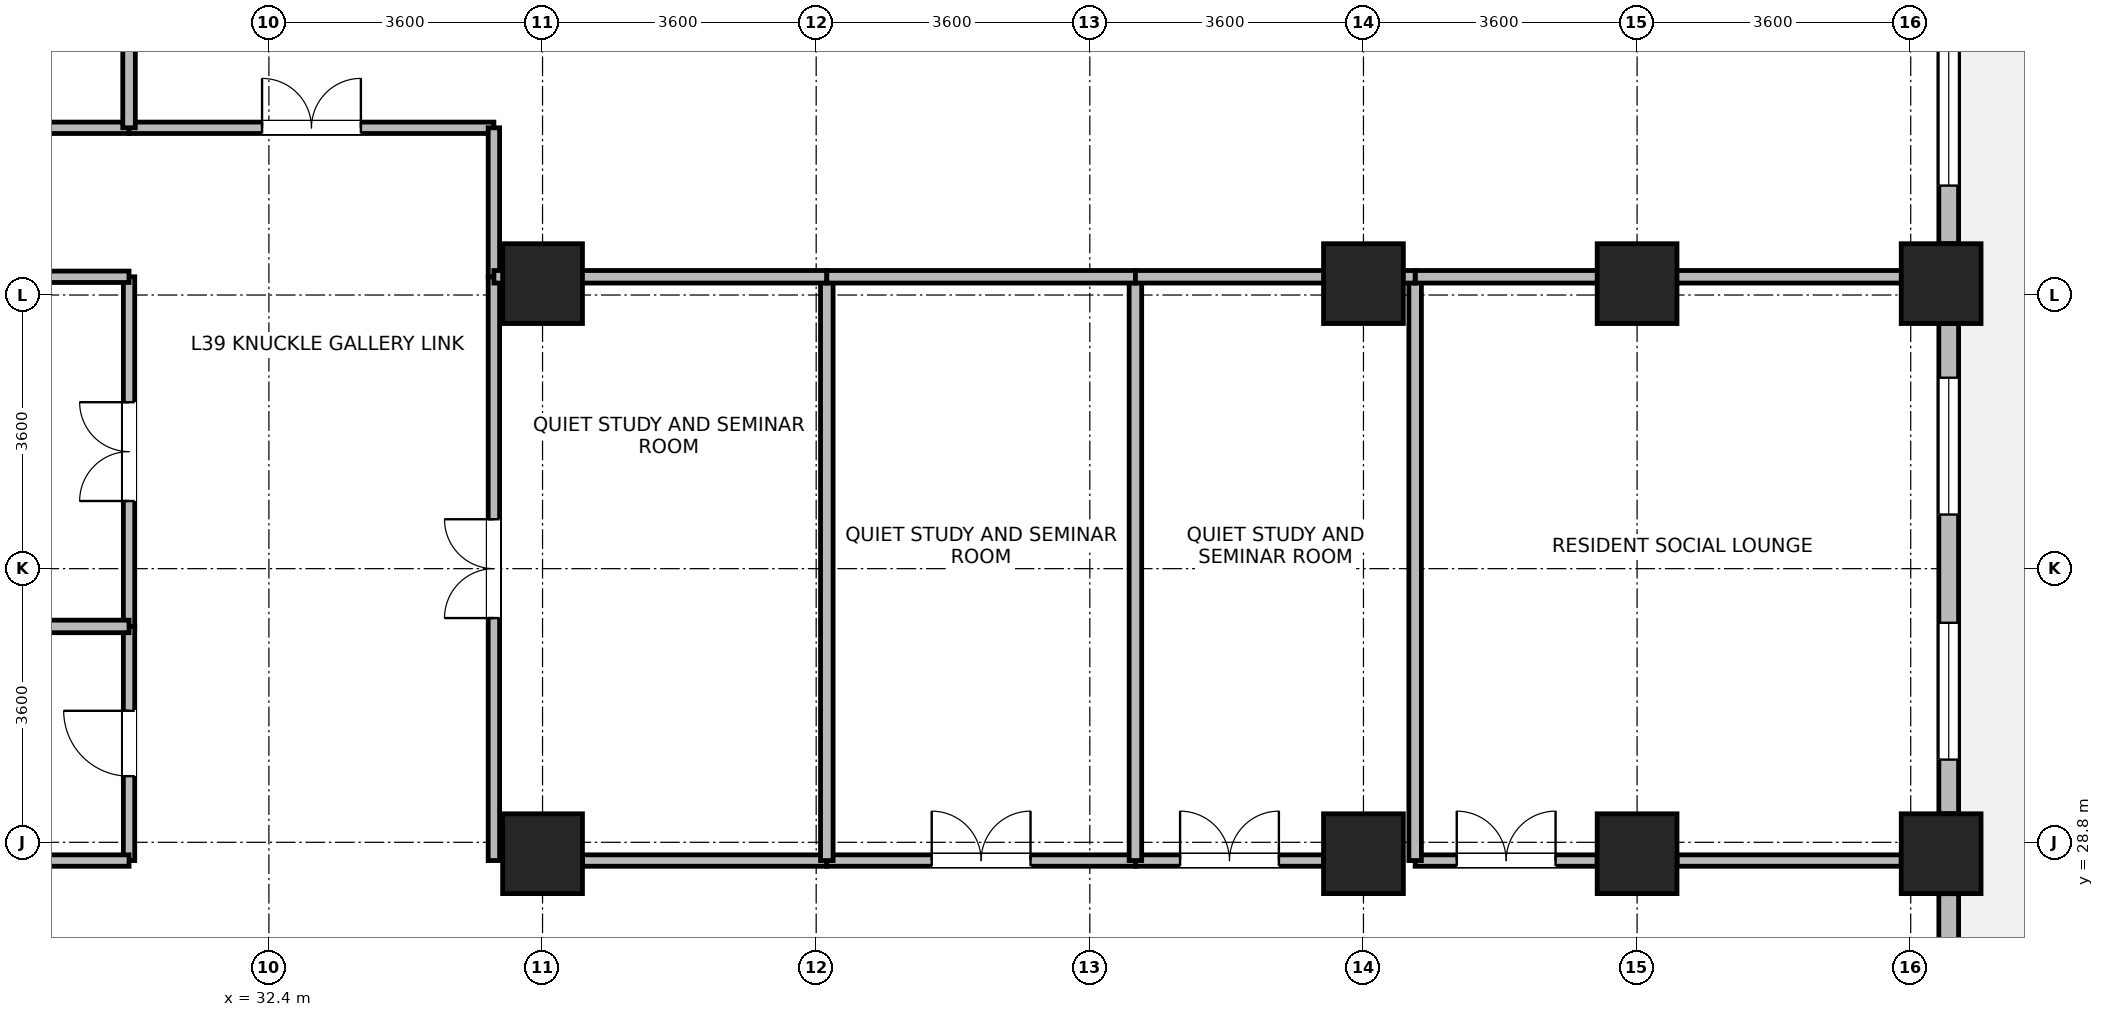
"""IFC4 building model, lengths in metres.
Left out: names, types, materials, properties, quantities, classifications, styles, units other than length and angle.
Written with IfcOpenShell. Run it as: python <this file> out.ifc"""

import sys

from ifc_helpers import new_model, si_unit, direction, frame, frame_2d, origin, origin_2d, place, context, subcontext, project, spatial, rectangle, extrude, source, transform, mapped, element, fill, save


model = new_model("IFC4")
c1 = context("Model", 3, precision=1e-05, world=origin(), true_north=direction((0.0, 1.0)))
c2 = subcontext(c1, "Body", "Model", "MODEL_VIEW")
j1 = project(units=[si_unit("LENGTHUNIT", "METRE"), si_unit("PLANEANGLEUNIT", "RADIAN")], contexts=[c1])
p1 = place(None, origin())
s1 = spatial("IfcSite", under=j1, at=p1, CompositionType="ELEMENT")
p2 = place(p1, origin())
s2 = spatial("IfcBuilding", under=s1, at=p2, CompositionType="ELEMENT")
p3 = place(p2, frame((0.0, 0.0, 155.0)))
s3 = spatial("IfcBuildingStorey", under=s2, at=p3, CompositionType="ELEMENT", Elevation=155.0)
m1 = source(origin(), c2, "Body", "SweptSolid", [
    extrude(rectangle(XDim=1.05, YDim=1.05, at=origin_2d()), origin(), (0.0, 0.0, 1.0), 3.7),
])
for number, where, z_axis, x_axis in (
    (1, (36.0, 28.65, 0.0), (0.0, 0.0, 1.0), (1.0, 0.0, 0.0)),
    (2, (36.0, 36.15, 0.0), (0.0, 0.0, 1.0), (1.0, 0.0, 0.0)),
    (3, (46.8, 28.65, 0.0), (0.0, 0.0, 1.0), (1.0, 0.0, 0.0)),
    (4, (46.8, 36.15, 0.0), (0.0, 0.0, 1.0), (1.0, 0.0, 0.0)),
    (5, (50.4, 28.65, 0.0), (0.0, 0.0, 1.0), (1.0, 0.0, 0.0)),
    (6, (50.4, 36.15, 0.0), (0.0, 0.0, 1.0), (1.0, 0.0, 0.0)),
    (7, (54.4, 28.65, 0.0), (0.0, 0.0, 1.0), (1.0, 0.0, 0.0)),
    (8, (54.4, 36.15, 0.0), (0.0, 0.0, 1.0), (1.0, 0.0, 0.0)),
):
    element("IfcColumn", number, at=place(p3, frame(where, z_axis=z_axis, x_axis=x_axis)), inside=s3, PredefinedType="COLUMN", context=c2, shape_type="MappedRepresentation", body=[
        mapped(m1, transform((0.0, 0.0, 0.0), x_axis=(1.0, 0.0, 0.0), y_axis=(0.0, 1.0, 0.0), z_axis=(0.0, 0.0, 1.0), scale=1.0)),
    ])
p4 = place(p3, frame((54.5, 28.124, 0.0), z_axis=(0.0, 0.0, 1.0), x_axis=(0.0, -1.0, 0.0)))
e9 = element("IfcWall", 9, at=p4, inside=s3, PredefinedType="STANDARD", context=c2, shape_type="SweptSolid", body=[
    extrude(rectangle(XDim=5.998, YDim=0.26, at=frame_2d((2.999, 0.0))), origin(), (0.0, 0.0, 1.0), 2.99),
])
p5 = place(p4, frame((3.598, 0.0, 0.85)))
e10 = element("IfcOpeningElement", 10, at=p5, cuts=e9, PredefinedType="OPENING", context=c2, shape_type="SweptSolid", body=[
    extrude(rectangle(XDim=1.8, YDim=1.85, at=frame_2d((0.9, 0.925))), frame((0.0, 0.14, 0.0), z_axis=(0.0, -1.0, 0.0), x_axis=(1.0, 0.0, 0.0)), (0.0, 0.0, 1.0), 0.28),
])
p6 = place(p4, frame((2.044, 0.0, 0.85)))
e11 = element("IfcOpeningElement", 11, at=p6, cuts=e9, PredefinedType="OPENING", context=c2, shape_type="SweptSolid", body=[
    extrude(rectangle(XDim=0.95, YDim=1.75, at=frame_2d((0.475, 0.875))), frame((0.0, 0.14, 0.0), z_axis=(0.0, -1.0, 0.0), x_axis=(1.0, 0.0, 0.0)), (0.0, 0.0, 1.0), 0.28),
])
p7 = place(p3, frame((54.5, 35.624, 0.0), z_axis=(0.0, 0.0, 1.0), x_axis=(0.0, -1.0, 0.0)))
e12 = element("IfcWall", 12, at=p7, inside=s3, PredefinedType="STANDARD", context=c2, shape_type="SweptSolid", body=[
    extrude(rectangle(XDim=6.448, YDim=0.26, at=frame_2d((3.224, 0.0))), origin(), (0.0, 0.0, 1.0), 2.99),
])
p8 = place(p7, frame((0.712, 0.0, 0.85)))
e13 = element("IfcOpeningElement", 13, at=p8, cuts=e12, PredefinedType="OPENING", context=c2, shape_type="SweptSolid", body=[
    extrude(rectangle(XDim=1.8, YDim=1.85, at=frame_2d((0.9, 0.925))), frame((0.0, 0.14, 0.0), z_axis=(0.0, -1.0, 0.0), x_axis=(1.0, 0.0, 0.0)), (0.0, 0.0, 1.0), 0.28),
])
p9 = place(p7, frame((3.936, 0.0, 0.85)))
e14 = element("IfcOpeningElement", 14, at=p9, cuts=e12, PredefinedType="OPENING", context=c2, shape_type="SweptSolid", body=[
    extrude(rectangle(XDim=1.8, YDim=1.85, at=frame_2d((0.9, 0.925))), frame((0.0, 0.14, 0.0), z_axis=(0.0, -1.0, 0.0), x_axis=(1.0, 0.0, 0.0)), (0.0, 0.0, 1.0), 0.28),
])
p10 = place(p3, frame((54.5, 43.33, 0.0), z_axis=(0.0, 0.0, 1.0), x_axis=(0.0, -1.0, 0.0)))
e15 = element("IfcWall", 15, at=p10, inside=s3, PredefinedType="STANDARD", context=c2, shape_type="SweptSolid", body=[
    extrude(rectangle(XDim=6.654, YDim=0.26, at=frame_2d((3.327, 0.0))), origin(), (0.0, 0.0, 1.0), 3.44),
])
p11 = place(p10, frame((0.763, 0.0, 0.85)))
e16 = element("IfcOpeningElement", 16, at=p11, cuts=e15, PredefinedType="OPENING", context=c2, shape_type="SweptSolid", body=[
    extrude(rectangle(XDim=1.8, YDim=1.85, at=frame_2d((0.9, 0.925))), frame((0.0, 0.14, 0.0), z_axis=(0.0, -1.0, 0.0), x_axis=(1.0, 0.0, 0.0)), (0.0, 0.0, 1.0), 0.28),
])
p12 = place(p10, frame((4.091, 0.0, 0.85)))
e17 = element("IfcOpeningElement", 17, at=p12, cuts=e15, PredefinedType="OPENING", context=c2, shape_type="SweptSolid", body=[
    extrude(rectangle(XDim=1.8, YDim=1.85, at=frame_2d((0.9, 0.925))), frame((0.0, 0.14, 0.0), z_axis=(0.0, -1.0, 0.0), x_axis=(1.0, 0.0, 0.0)), (0.0, 0.0, 1.0), 0.28),
])
p13 = place(p3, frame((22.74, 38.2, 0.0), z_axis=(0.0, 0.0, 1.0), x_axis=(1.0, 0.0, 0.0)))
e18 = element("IfcWall", 18, at=p13, inside=s3, PredefinedType="PARTITIONING", context=c2, shape_type="SweptSolid", body=[
    extrude(rectangle(XDim=7.82, YDim=0.15, at=frame_2d((3.91, 0.0))), origin(), (0.0, 0.0, 1.0), 3.44),
])
p14 = place(p13, frame((3.46, 0.0, 0.0)))
e19 = element("IfcOpeningElement", 19, at=p14, cuts=e18, PredefinedType="OPENING", context=c2, shape_type="SweptSolid", body=[
    extrude(rectangle(XDim=0.9, YDim=2.08, at=frame_2d((0.45, 1.04))), frame((0.0, 0.085, 0.0), z_axis=(0.0, -1.0, 0.0), x_axis=(1.0, 0.0, 0.0)), (0.0, 0.0, 1.0), 0.17),
])
p15 = place(p3, frame((35.36, 28.56, 0.0), z_axis=(0.0, 0.0, 1.0), x_axis=(0.0, 1.0, 0.0)))
e20 = element("IfcWall", 20, at=p15, inside=s3, PredefinedType="PARTITIONING", context=c2, shape_type="SweptSolid", body=[
    extrude(rectangle(XDim=7.68, YDim=0.15, at=frame_2d((3.84, 0.0))), origin(), (0.0, 0.0, 1.0), 3.44),
])
p16 = place(p15, frame((3.19, 0.0, 0.0)))
e21 = element("IfcOpeningElement", 21, at=p16, cuts=e20, PredefinedType="OPENING", context=c2, shape_type="SweptSolid", body=[
    extrude(rectangle(XDim=1.3, YDim=2.12, at=frame_2d((0.65, 1.06))), frame((0.0, 0.085, 0.0), z_axis=(0.0, -1.0, 0.0), x_axis=(1.0, 0.0, 0.0)), (0.0, 0.0, 1.0), 0.17),
])
p17 = place(p3, frame((47.48, 28.56, 0.0), z_axis=(0.0, 0.0, 1.0), x_axis=(1.0, 0.0, 0.0)))
e22 = element("IfcWall", 22, at=p17, inside=s3, PredefinedType="PARTITIONING", context=c2, shape_type="SweptSolid", body=[
    extrude(rectangle(XDim=2.395, YDim=0.15, at=frame_2d((1.198, 0.0))), origin(), (0.0, 0.0, 1.0), 2.84),
])
p18 = place(p17, frame((0.548, 0.0, 0.0)))
e23 = element("IfcOpeningElement", 23, at=p18, cuts=e22, PredefinedType="OPENING", context=c2, shape_type="SweptSolid", body=[
    extrude(rectangle(XDim=1.3, YDim=2.12, at=frame_2d((0.65, 1.06))), frame((0.0, 0.085, 0.0), z_axis=(0.0, -1.0, 0.0), x_axis=(1.0, 0.0, 0.0)), (0.0, 0.0, 1.0), 0.17),
])
p19 = place(p3, frame((50.925, 28.56, 0.0), z_axis=(0.0, 0.0, 1.0), x_axis=(1.0, 0.0, 0.0)))
e24 = element("IfcWall", 24, at=p19, inside=s3, PredefinedType="PARTITIONING", context=c2, shape_type="SweptSolid", body=[
    extrude(rectangle(XDim=2.95, YDim=0.15, at=frame_2d((1.475, 0.0))), origin(), (0.0, 0.0, 1.0), 2.84),
])
p20 = place(p3, frame((30.56, 38.2, 0.0), z_axis=(0.0, 0.0, 1.0), x_axis=(1.0, 0.0, 0.0)))
e25 = element("IfcWall", 25, at=p20, inside=s3, PredefinedType="PARTITIONING", context=c2, shape_type="SweptSolid", body=[
    extrude(rectangle(XDim=4.8, YDim=0.15, at=frame_2d((2.4, 0.0))), origin(), (0.0, 0.0, 1.0), 3.44),
])
p21 = place(p20, frame((1.75, 0.0, 0.0)))
e26 = element("IfcOpeningElement", 26, at=p21, cuts=e25, PredefinedType="OPENING", context=c2, shape_type="SweptSolid", body=[
    extrude(rectangle(XDim=1.3, YDim=2.12, at=frame_2d((0.65, 1.06))), frame((0.0, 0.085, 0.0), z_axis=(0.0, -1.0, 0.0), x_axis=(1.0, 0.0, 0.0)), (0.0, 0.0, 1.0), 0.17),
])
p22 = place(p3, frame((30.56, 31.64, 0.0), z_axis=(0.0, 0.0, 1.0), x_axis=(0.0, 1.0, 0.0)))
e27 = element("IfcWall", 27, at=p22, inside=s3, PredefinedType="PARTITIONING", context=c2, shape_type="SweptSolid", body=[
    extrude(rectangle(XDim=4.6, YDim=0.15, at=frame_2d((2.3, 0.0))), origin(), (0.0, 0.0, 1.0), 3.44),
])
p23 = place(p22, frame((1.65, 0.0, 0.0)))
e28 = element("IfcOpeningElement", 28, at=p23, cuts=e27, PredefinedType="OPENING", context=c2, shape_type="SweptSolid", body=[
    extrude(rectangle(XDim=1.3, YDim=2.12, at=frame_2d((0.65, 1.06))), frame((0.0, 0.085, 0.0), z_axis=(0.0, -1.0, 0.0), x_axis=(1.0, 0.0, 0.0)), (0.0, 0.0, 1.0), 0.17),
])
p24 = place(p3, frame((36.525, 28.56, 0.0), z_axis=(0.0, 0.0, 1.0), x_axis=(1.0, 0.0, 0.0)))
e29 = element("IfcWall", 29, at=p24, inside=s3, PredefinedType="PARTITIONING", context=c2, shape_type="SweptSolid", body=[
    extrude(rectangle(XDim=3.215, YDim=0.15, at=frame_2d((1.607, 0.0))), origin(), (0.0, 0.0, 1.0), 2.84),
])
p25 = place(p3, frame((39.74, 28.56, 0.0), z_axis=(0.0, 0.0, 1.0), x_axis=(1.0, 0.0, 0.0)))
e30 = element("IfcWall", 30, at=p25, inside=s3, PredefinedType="PARTITIONING", context=c2, shape_type="SweptSolid", body=[
    extrude(rectangle(XDim=4.06, YDim=0.15, at=frame_2d((2.03, 0.0))), origin(), (0.0, 0.0, 1.0), 2.84),
])
p26 = place(p25, frame((1.38, 0.0, 0.0)))
e31 = element("IfcOpeningElement", 31, at=p26, cuts=e30, PredefinedType="OPENING", context=c2, shape_type="SweptSolid", body=[
    extrude(rectangle(XDim=1.3, YDim=2.12, at=frame_2d((0.65, 1.06))), frame((0.0, 0.085, 0.0), z_axis=(0.0, -1.0, 0.0), x_axis=(1.0, 0.0, 0.0)), (0.0, 0.0, 1.0), 0.17),
])
p27 = place(p3, frame((43.8, 28.56, 0.0), z_axis=(0.0, 0.0, 1.0), x_axis=(1.0, 0.0, 0.0)))
e32 = element("IfcWall", 32, at=p27, inside=s3, PredefinedType="PARTITIONING", context=c2, shape_type="SweptSolid", body=[
    extrude(rectangle(XDim=2.475, YDim=0.15, at=frame_2d((1.237, 0.0))), origin(), (0.0, 0.0, 1.0), 2.84),
])
p28 = place(p27, frame((0.587, 0.0, 0.0)))
e33 = element("IfcOpeningElement", 33, at=p28, cuts=e32, PredefinedType="OPENING", context=c2, shape_type="SweptSolid", body=[
    extrude(rectangle(XDim=1.3, YDim=2.12, at=frame_2d((0.65, 1.06))), frame((0.0, 0.085, 0.0), z_axis=(0.0, -1.0, 0.0), x_axis=(1.0, 0.0, 0.0)), (0.0, 0.0, 1.0), 0.17),
])
p29 = place(p3, frame((30.56, 28.56, 0.0), z_axis=(0.0, 0.0, 1.0), x_axis=(0.0, 1.0, 0.0)))
e34 = element("IfcWall", 34, at=p29, inside=s3, PredefinedType="PARTITIONING", context=c2, shape_type="SweptSolid", body=[
    extrude(rectangle(XDim=3.08, YDim=0.15, at=frame_2d((1.54, 0.0))), origin(), (0.0, 0.0, 1.0), 3.44),
])
p30 = place(p29, frame((1.11, 0.0, 0.0)))
e35 = element("IfcOpeningElement", 35, at=p30, cuts=e34, PredefinedType="OPENING", context=c2, shape_type="SweptSolid", body=[
    extrude(rectangle(XDim=0.86, YDim=2.02, at=frame_2d((0.43, 1.01))), frame((0.0, 0.085, 0.0), z_axis=(0.0, -1.0, 0.0), x_axis=(1.0, 0.0, 0.0)), (0.0, 0.0, 1.0), 0.17),
])
p31 = place(p3, frame((35.36, 36.24, 0.0), z_axis=(0.0, 0.0, 1.0), x_axis=(0.0, 1.0, 0.0)))
e36 = element("IfcWall", 36, at=p31, inside=s3, PredefinedType="PARTITIONING", context=c2, shape_type="SweptSolid", body=[
    extrude(rectangle(XDim=1.96, YDim=0.15, at=frame_2d((0.98, 0.0))), origin(), (0.0, 0.0, 1.0), 3.44),
])
for number, where, z_axis, x_axis in (
    (37, (29.325, 28.56, 0.0), (0.0, 0.0, 1.0), (1.0, 0.0, 0.0)),
    (38, (29.325, 36.24, 0.0), (0.0, 0.0, 1.0), (1.0, 0.0, 0.0)),
):
    element("IfcWall", number, at=place(p3, frame(where, z_axis=z_axis, x_axis=x_axis)), inside=s3, PredefinedType="PARTITIONING", context=c2, shape_type="SweptSolid", body=[
        extrude(rectangle(XDim=1.235, YDim=0.15, at=frame_2d((0.618, 0.0))), origin(), (0.0, 0.0, 1.0), 2.84),
    ])
for number, where, z_axis, x_axis in (
    (39, (39.74, 28.56, 0.0), (0.0, 0.0, 1.0), (0.0, 1.0, 0.0)),
    (40, (43.8, 28.56, 0.0), (0.0, 0.0, 1.0), (0.0, 1.0, 0.0)),
    (41, (47.48, 28.56, 0.0), (0.0, 0.0, 1.0), (0.0, 1.0, 0.0)),
):
    element("IfcWall", number, at=place(p3, frame(where, z_axis=z_axis, x_axis=x_axis)), inside=s3, PredefinedType="PARTITIONING", context=c2, shape_type="SweptSolid", body=[
        extrude(rectangle(XDim=7.68, YDim=0.165, at=frame_2d((3.84, 0.0))), origin(), (0.0, 0.0, 1.0), 3.44),
    ])
p32 = place(p3, frame((47.48, 36.24, 0.0), z_axis=(0.0, 0.0, 1.0), x_axis=(1.0, 0.0, 0.0)))
e42 = element("IfcWall", 42, at=p32, inside=s3, PredefinedType="PARTITIONING", context=c2, shape_type="SweptSolid", body=[
    extrude(rectangle(XDim=6.888, YDim=0.165, at=frame_2d((3.444, 0.0))), origin(), (0.0, 0.0, 1.0), 2.84),
])
p33 = place(p3, frame((30.56, 38.2, 0.0), z_axis=(0.0, 0.0, 1.0), x_axis=(0.0, 1.0, 0.0)))
e43 = element("IfcWall", 43, at=p33, inside=s3, PredefinedType="PARTITIONING", context=c2, shape_type="SweptSolid", body=[
    extrude(rectangle(XDim=4.868, YDim=0.165, at=frame_2d((2.434, 0.0))), origin(), (0.0, 0.0, 1.0), 3.44),
])
p34 = place(p3, frame((35.36, 36.24, 0.0), z_axis=(0.0, 0.0, 1.0), x_axis=(1.0, 0.0, 0.0)))
e44 = element("IfcWall", 44, at=p34, inside=s3, PredefinedType="PARTITIONING", context=c2, shape_type="SweptSolid", body=[
    extrude(rectangle(XDim=4.38, YDim=0.165, at=frame_2d((2.19, 0.0))), origin(), (0.0, 0.0, 1.0), 2.84),
])
p35 = place(p3, frame((39.74, 36.24, 0.0), z_axis=(0.0, 0.0, 1.0), x_axis=(1.0, 0.0, 0.0)))
e45 = element("IfcWall", 45, at=p35, inside=s3, PredefinedType="PARTITIONING", context=c2, shape_type="SweptSolid", body=[
    extrude(rectangle(XDim=4.06, YDim=0.165, at=frame_2d((2.03, 0.0))), origin(), (0.0, 0.0, 1.0), 2.84),
])
p36 = place(p3, frame((43.8, 36.24, 0.0), z_axis=(0.0, 0.0, 1.0), x_axis=(1.0, 0.0, 0.0)))
e46 = element("IfcWall", 46, at=p36, inside=s3, PredefinedType="PARTITIONING", context=c2, shape_type="SweptSolid", body=[
    extrude(rectangle(XDim=3.68, YDim=0.165, at=frame_2d((1.84, 0.0))), origin(), (0.0, 0.0, 1.0), 2.84),
])
p37 = place(p3, frame((28.84, 31.64, 0.0), z_axis=(0.0, 0.0, 1.0), x_axis=(1.0, 0.0, 0.0)))
e47 = element("IfcWall", 47, at=p37, inside=s3, PredefinedType="PARTITIONING", context=c2, shape_type="SweptSolid", body=[
    extrude(rectangle(XDim=1.72, YDim=0.165, at=frame_2d((0.86, 0.0))), origin(), (0.0, 0.0, 1.0), 3.44),
])
p38 = place(p8, origin())
e48 = element("IfcWindow", 48, at=p38, inside=s3, PartitioningType="SINGLE_PANEL", PredefinedType="WINDOW", context=c2, shape_type="SweptSolid", body=[
    extrude(rectangle(XDim=1.8, YDim=1.85, at=frame_2d((0.9, 0.925))), frame((0.0, 0.03, 0.0), z_axis=(0.0, -1.0, 0.0), x_axis=(1.0, 0.0, 0.0)), (0.0, 0.0, 1.0), 0.06),
])
fill(e13, e48)
p39 = place(p9, origin())
e49 = element("IfcWindow", 49, at=p39, inside=s3, PartitioningType="SINGLE_PANEL", PredefinedType="WINDOW", context=c2, shape_type="SweptSolid", body=[
    extrude(rectangle(XDim=1.8, YDim=1.85, at=frame_2d((0.9, 0.925))), frame((0.0, 0.03, 0.0), z_axis=(0.0, -1.0, 0.0), x_axis=(1.0, 0.0, 0.0)), (0.0, 0.0, 1.0), 0.06),
])
fill(e14, e49)
p40 = place(p12, origin())
e50 = element("IfcWindow", 50, at=p40, inside=s3, PartitioningType="SINGLE_PANEL", PredefinedType="WINDOW", context=c2, shape_type="SweptSolid", body=[
    extrude(rectangle(XDim=1.8, YDim=1.85, at=frame_2d((0.9, 0.925))), frame((0.0, 0.03, 0.0), z_axis=(0.0, -1.0, 0.0), x_axis=(1.0, 0.0, 0.0)), (0.0, 0.0, 1.0), 0.06),
])
fill(e17, e50)
p41 = place(p16, origin())
e51 = element("IfcDoor", 51, at=p41, inside=s3, OperationType="DOUBLE_DOOR_SINGLE_SWING", PredefinedType="DOOR", context=c2, shape_type="SweptSolid", body=[
    extrude(rectangle(XDim=1.3, YDim=2.12, at=frame_2d((0.65, 1.06))), frame((0.0, 0.025, 0.0), z_axis=(0.0, -1.0, 0.0), x_axis=(1.0, 0.0, 0.0)), (0.0, 0.0, 1.0), 0.05),
])
fill(e21, e51)
p42 = place(p18, origin())
e52 = element("IfcDoor", 52, at=p42, inside=s3, OperationType="DOUBLE_DOOR_SINGLE_SWING", PredefinedType="DOOR", context=c2, shape_type="SweptSolid", body=[
    extrude(rectangle(XDim=1.3, YDim=2.12, at=frame_2d((0.65, 1.06))), frame((0.0, 0.025, 0.0), z_axis=(0.0, -1.0, 0.0), x_axis=(1.0, 0.0, 0.0)), (0.0, 0.0, 1.0), 0.05),
])
fill(e23, e52)
p43 = place(p21, origin())
e53 = element("IfcDoor", 53, at=p43, inside=s3, OperationType="DOUBLE_DOOR_SINGLE_SWING", PredefinedType="DOOR", context=c2, shape_type="SweptSolid", body=[
    extrude(rectangle(XDim=1.3, YDim=2.12, at=frame_2d((0.65, 1.06))), frame((0.0, 0.025, 0.0), z_axis=(0.0, -1.0, 0.0), x_axis=(1.0, 0.0, 0.0)), (0.0, 0.0, 1.0), 0.05),
])
fill(e26, e53)
p44 = place(p23, origin())
e54 = element("IfcDoor", 54, at=p44, inside=s3, OperationType="DOUBLE_DOOR_SINGLE_SWING", PredefinedType="DOOR", context=c2, shape_type="SweptSolid", body=[
    extrude(rectangle(XDim=1.3, YDim=2.12, at=frame_2d((0.65, 1.06))), frame((0.0, 0.025, 0.0), z_axis=(0.0, -1.0, 0.0), x_axis=(1.0, 0.0, 0.0)), (0.0, 0.0, 1.0), 0.05),
])
fill(e28, e54)
p45 = place(p26, origin())
e55 = element("IfcDoor", 55, at=p45, inside=s3, OperationType="DOUBLE_DOOR_SINGLE_SWING", PredefinedType="DOOR", context=c2, shape_type="SweptSolid", body=[
    extrude(rectangle(XDim=1.3, YDim=2.12, at=frame_2d((0.65, 1.06))), frame((0.0, 0.025, 0.0), z_axis=(0.0, -1.0, 0.0), x_axis=(1.0, 0.0, 0.0)), (0.0, 0.0, 1.0), 0.05),
])
fill(e31, e55)
p46 = place(p28, origin())
e56 = element("IfcDoor", 56, at=p46, inside=s3, OperationType="DOUBLE_DOOR_SINGLE_SWING", PredefinedType="DOOR", context=c2, shape_type="SweptSolid", body=[
    extrude(rectangle(XDim=1.3, YDim=2.12, at=frame_2d((0.65, 1.06))), frame((0.0, 0.025, 0.0), z_axis=(0.0, -1.0, 0.0), x_axis=(1.0, 0.0, 0.0)), (0.0, 0.0, 1.0), 0.05),
])
fill(e33, e56)
p47 = place(p30, origin())
e57 = element("IfcDoor", 57, at=p47, inside=s3, OperationType="SINGLE_SWING_RIGHT", PredefinedType="DOOR", context=c2, shape_type="SweptSolid", body=[
    extrude(rectangle(XDim=0.86, YDim=2.02, at=frame_2d((0.43, 1.01))), frame((0.0, 0.025, 0.0), z_axis=(0.0, -1.0, 0.0), x_axis=(1.0, 0.0, 0.0)), (0.0, 0.0, 1.0), 0.05),
])
fill(e35, e57)
save(model, sys.argv[1])
